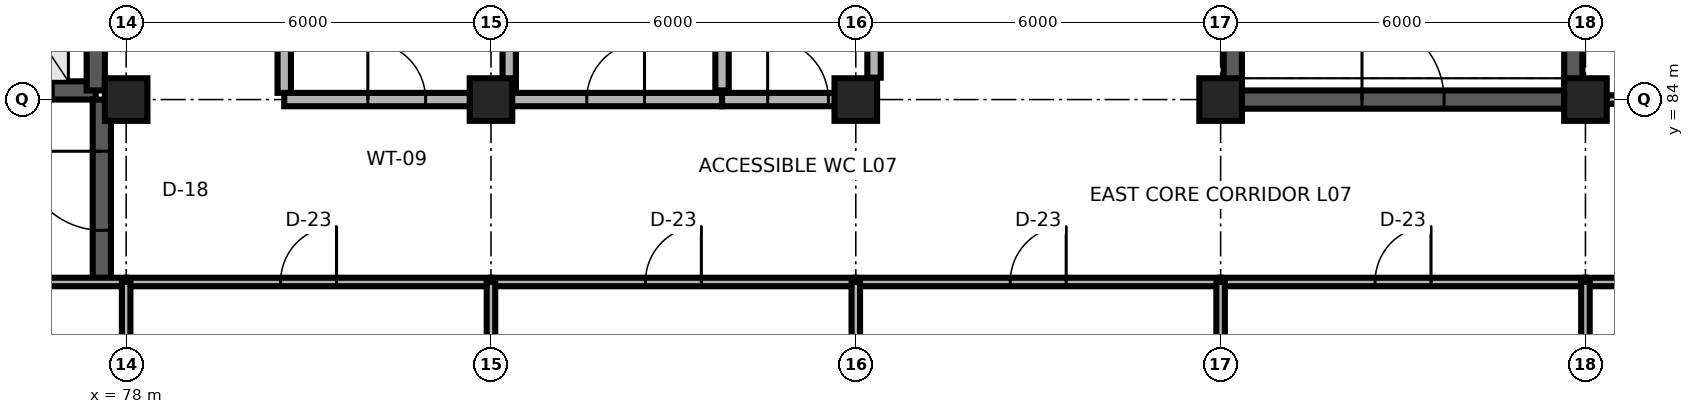
"""IFC4 building model, lengths in metres.
Left out: names, types, materials, properties, quantities, classifications, styles, units other than length and angle.
Written with IfcOpenShell. Run it as: python <this file> out.ifc"""

import sys

from ifc_helpers import new_model, si_unit, direction, frame, frame_2d, origin, origin_2d, place, context, subcontext, project, spatial, rectangle, extrude, element, fill, save


model = new_model("IFC4")
c1 = context("Model", 3, precision=1e-05, world=origin(), true_north=direction((0.0, 1.0)))
c2 = subcontext(c1, "Body", "Model", "MODEL_VIEW")
j1 = project(units=[si_unit("LENGTHUNIT", "METRE"), si_unit("PLANEANGLEUNIT", "RADIAN")], contexts=[c1])
p1 = place(None, origin())
s1 = spatial("IfcSite", under=j1, at=p1, CompositionType="ELEMENT")
p2 = place(p1, origin())
s2 = spatial("IfcBuilding", under=s1, at=p2, CompositionType="ELEMENT")
p3 = place(p2, frame((0.0, 0.0, 28.8)))
s3 = spatial("IfcBuildingStorey", under=s2, at=p3, CompositionType="ELEMENT", Elevation=28.8)
for number, where, z_axis, x_axis in (
    (1, (78.0, 84.0, 0.0), (0.0, 0.0, 1.0), (1.0, 0.0, 0.0)),
    (2, (84.0, 84.0, 0.0), (0.0, 0.0, 1.0), (1.0, 0.0, 0.0)),
    (3, (90.0, 84.0, 0.0), (0.0, 0.0, 1.0), (1.0, 0.0, 0.0)),
    (4, (96.0, 84.0, 0.0), (0.0, 0.0, 1.0), (1.0, 0.0, 0.0)),
    (5, (102.0, 84.0, 0.0), (0.0, 0.0, 1.0), (1.0, 0.0, 0.0)),
):
    element("IfcColumn", number, at=place(p3, frame(where, z_axis=z_axis, x_axis=x_axis)), inside=s3, PredefinedType="COLUMN", context=c2, shape_type="SweptSolid", body=[
        extrude(rectangle(XDim=0.7, YDim=0.7, at=origin_2d()), origin(), (0.0, 0.0, 1.0), 3.9),
    ])
p4 = place(p3, frame((96.35, 84.0, 0.0), z_axis=(0.0, 0.0, 1.0), x_axis=(1.0, 0.0, 0.0)))
e6 = element("IfcWall", 6, at=p4, inside=s3, PredefinedType="SHEAR", context=c2, shape_type="SweptSolid", body=[
    extrude(rectangle(XDim=5.3, YDim=0.3, at=frame_2d((2.65, 0.0))), origin(), (0.0, 0.0, 1.0), 3.66),
])
p5 = place(p4, frame((1.975, 0.0, 0.0)))
e7 = element("IfcOpeningElement", 7, at=p5, cuts=e6, PredefinedType="OPENING", context=c2, shape_type="SweptSolid", body=[
    extrude(rectangle(XDim=1.35, YDim=2.2, at=frame_2d((0.675, 1.1))), frame((0.0, 0.165, 0.0), z_axis=(0.0, -1.0, 0.0), x_axis=(1.0, 0.0, 0.0)), (0.0, 0.0, 1.0), 0.33),
])
for number, where, z_axis, x_axis in (
    (8, (96.2, 84.0, 0.0), (0.0, 0.0, 1.0), (0.0, 1.0, 0.0)),
    (9, (101.8, 84.0, 0.0), (0.0, 0.0, 1.0), (0.0, 1.0, 0.0)),
):
    element("IfcWall", number, at=place(p3, frame(where, z_axis=z_axis, x_axis=x_axis)), inside=s3, PredefinedType="SHEAR", context=c2, shape_type="SweptSolid", body=[
        extrude(rectangle(XDim=11.8, YDim=0.3, at=frame_2d((5.9, 0.0))), origin(), (0.0, 0.0, 1.0), 3.74),
    ])
p6 = place(p3, frame((75.0, 84.15, 0.0), z_axis=(0.0, 0.0, 1.0), x_axis=(1.0, 0.0, 0.0)))
e10 = element("IfcWall", 10, at=p6, inside=s3, PredefinedType="SHEAR", context=c2, shape_type="SweptSolid", body=[
    extrude(rectangle(XDim=2.5, YDim=0.3, at=frame_2d((1.25, 0.0))), origin(), (0.0, 0.0, 1.0), 3.74),
])
p7 = place(p6, frame((0.7, 0.0, 0.0)))
e11 = element("IfcOpeningElement", 11, at=p7, cuts=e10, PredefinedType="OPENING", context=c2, shape_type="SweptSolid", body=[
    extrude(rectangle(XDim=1.1, YDim=2.1, at=frame_2d((0.55, 1.05))), frame((0.0, 0.165, 0.0), z_axis=(0.0, -1.0, 0.0), x_axis=(1.0, 0.0, 0.0)), (0.0, 0.0, 1.0), 0.33),
])
p8 = place(p3, frame((77.5, 84.15, 0.0), z_axis=(0.0, 0.0, 1.0), x_axis=(0.0, 1.0, 0.0)))
e12 = element("IfcWall", 12, at=p8, inside=s3, PredefinedType="SHEAR", context=c2, shape_type="SweptSolid", body=[
    extrude(rectangle(XDim=3.4, YDim=0.3, at=frame_2d((1.7, 0.0))), origin(), (0.0, 0.0, 1.0), 3.74),
])
p9 = place(p3, frame((77.6, 81.0, 0.0), z_axis=(0.0, 0.0, 1.0), x_axis=(0.0, 1.0, 0.0)))
e13 = element("IfcWall", 13, at=p9, inside=s3, PredefinedType="SHEAR", context=c2, shape_type="SweptSolid", body=[
    extrude(rectangle(XDim=3.0, YDim=0.3, at=frame_2d((1.5, 0.0))), origin(), (0.0, 0.0, 1.0), 3.74),
])
p10 = place(p9, frame((0.85, 0.0, 0.0)))
e14 = element("IfcOpeningElement", 14, at=p10, cuts=e13, PredefinedType="OPENING", context=c2, shape_type="SweptSolid", body=[
    extrude(rectangle(XDim=1.3, YDim=2.2, at=frame_2d((0.65, 1.1))), frame((0.0, 0.165, 0.0), z_axis=(0.0, -1.0, 0.0), x_axis=(1.0, 0.0, 0.0)), (0.0, 0.0, 1.0), 0.33),
])
p11 = place(p3, frame((80.6, 84.0, 0.0), z_axis=(0.0, 0.0, 1.0), x_axis=(1.0, 0.0, 0.0)))
e15 = element("IfcWall", 15, at=p11, inside=s3, PredefinedType="PARTITIONING", context=c2, shape_type="SweptSolid", body=[
    extrude(rectangle(XDim=3.7, YDim=0.22, at=frame_2d((1.85, 0.0))), origin(), (0.0, 0.0, 1.0), 3.352),
])
p12 = place(p11, frame((1.375, 0.0, 0.0)))
e16 = element("IfcOpeningElement", 16, at=p12, cuts=e15, PredefinedType="OPENING", context=c2, shape_type="SweptSolid", body=[
    extrude(rectangle(XDim=0.95, YDim=2.15, at=frame_2d((0.475, 1.075))), frame((0.0, 0.125, 0.0), z_axis=(0.0, -1.0, 0.0), x_axis=(1.0, 0.0, 0.0)), (0.0, 0.0, 1.0), 0.25),
])
p13 = place(p3, frame((84.3, 84.0, 0.0), z_axis=(0.0, 0.0, 1.0), x_axis=(1.0, 0.0, 0.0)))
e17 = element("IfcWall", 17, at=p13, inside=s3, PredefinedType="PARTITIONING", context=c2, shape_type="SweptSolid", body=[
    extrude(rectangle(XDim=3.5, YDim=0.22, at=frame_2d((1.75, 0.0))), origin(), (0.0, 0.0, 1.0), 3.352),
])
p14 = place(p13, frame((1.275, 0.0, 0.0)))
e18 = element("IfcOpeningElement", 18, at=p14, cuts=e17, PredefinedType="OPENING", context=c2, shape_type="SweptSolid", body=[
    extrude(rectangle(XDim=0.95, YDim=2.1, at=frame_2d((0.475, 1.05))), frame((0.0, 0.125, 0.0), z_axis=(0.0, -1.0, 0.0), x_axis=(1.0, 0.0, 0.0)), (0.0, 0.0, 1.0), 0.25),
])
p15 = place(p3, frame((87.8, 84.0, 0.0), z_axis=(0.0, 0.0, 1.0), x_axis=(1.0, 0.0, 0.0)))
e19 = element("IfcWall", 19, at=p15, inside=s3, PredefinedType="PARTITIONING", context=c2, shape_type="SweptSolid", body=[
    extrude(rectangle(XDim=2.5, YDim=0.22, at=frame_2d((1.25, 0.0))), origin(), (0.0, 0.0, 1.0), 3.352),
])
p16 = place(p15, frame((0.75, 0.0, 0.0)))
e20 = element("IfcOpeningElement", 20, at=p16, cuts=e19, PredefinedType="OPENING", context=c2, shape_type="SweptSolid", body=[
    extrude(rectangle(XDim=1.0, YDim=2.15, at=frame_2d((0.5, 1.075))), frame((0.0, 0.125, 0.0), z_axis=(0.0, -1.0, 0.0), x_axis=(1.0, 0.0, 0.0)), (0.0, 0.0, 1.0), 0.25),
])
for number, where, z_axis, x_axis in (
    (21, (84.3, 84.15, 0.0), (0.0, 0.0, 1.0), (0.0, 1.0, 0.0)),
    (22, (87.8, 84.15, 0.0), (0.0, 0.0, 1.0), (0.0, 1.0, 0.0)),
):
    element("IfcWall", number, at=place(p3, frame(where, z_axis=z_axis, x_axis=x_axis)), inside=s3, PredefinedType="PARTITIONING", context=c2, shape_type="SweptSolid", body=[
        extrude(rectangle(XDim=5.0, YDim=0.22, at=frame_2d((2.5, 0.0))), origin(), (0.0, 0.0, 1.0), 3.74),
    ])
p17 = place(p3, frame((72.0, 81.0, 0.0), z_axis=(0.0, 0.0, 1.0), x_axis=(1.0, 0.0, 0.0)))
e23 = element("IfcWall", 23, at=p17, inside=s3, PredefinedType="PARTITIONING", context=c2, shape_type="SweptSolid", body=[
    extrude(rectangle(XDim=6.0, YDim=0.14, at=frame_2d((3.0, 0.0))), origin(), (0.0, 0.0, 1.0), 3.74),
])
p18 = place(p17, frame((2.54, 0.0, 0.0)))
e24 = element("IfcOpeningElement", 24, at=p18, cuts=e23, PredefinedType="OPENING", context=c2, shape_type="SweptSolid", body=[
    extrude(rectangle(XDim=0.92, YDim=2.15, at=frame_2d((0.46, 1.075))), frame((0.0, 0.085, 0.0), z_axis=(0.0, -1.0, 0.0), x_axis=(1.0, 0.0, 0.0)), (0.0, 0.0, 1.0), 0.17),
])
p19 = place(p3, frame((78.0, 81.0, 0.0), z_axis=(0.0, 0.0, 1.0), x_axis=(1.0, 0.0, 0.0)))
e25 = element("IfcWall", 25, at=p19, inside=s3, PredefinedType="PARTITIONING", context=c2, shape_type="SweptSolid", body=[
    extrude(rectangle(XDim=6.0, YDim=0.14, at=frame_2d((3.0, 0.0))), origin(), (0.0, 0.0, 1.0), 3.74),
])
p20 = place(p19, frame((2.54, 0.0, 0.0)))
e26 = element("IfcOpeningElement", 26, at=p20, cuts=e25, PredefinedType="OPENING", context=c2, shape_type="SweptSolid", body=[
    extrude(rectangle(XDim=0.92, YDim=2.15, at=frame_2d((0.46, 1.075))), frame((0.0, 0.085, 0.0), z_axis=(0.0, -1.0, 0.0), x_axis=(1.0, 0.0, 0.0)), (0.0, 0.0, 1.0), 0.17),
])
p21 = place(p3, frame((84.0, 81.0, 0.0), z_axis=(0.0, 0.0, 1.0), x_axis=(1.0, 0.0, 0.0)))
e27 = element("IfcWall", 27, at=p21, inside=s3, PredefinedType="PARTITIONING", context=c2, shape_type="SweptSolid", body=[
    extrude(rectangle(XDim=6.0, YDim=0.14, at=frame_2d((3.0, 0.0))), origin(), (0.0, 0.0, 1.0), 3.74),
])
p22 = place(p21, frame((2.54, 0.0, 0.0)))
e28 = element("IfcOpeningElement", 28, at=p22, cuts=e27, PredefinedType="OPENING", context=c2, shape_type="SweptSolid", body=[
    extrude(rectangle(XDim=0.92, YDim=2.15, at=frame_2d((0.46, 1.075))), frame((0.0, 0.085, 0.0), z_axis=(0.0, -1.0, 0.0), x_axis=(1.0, 0.0, 0.0)), (0.0, 0.0, 1.0), 0.17),
])
p23 = place(p3, frame((90.0, 81.0, 0.0), z_axis=(0.0, 0.0, 1.0), x_axis=(1.0, 0.0, 0.0)))
e29 = element("IfcWall", 29, at=p23, inside=s3, PredefinedType="PARTITIONING", context=c2, shape_type="SweptSolid", body=[
    extrude(rectangle(XDim=6.0, YDim=0.14, at=frame_2d((3.0, 0.0))), origin(), (0.0, 0.0, 1.0), 3.74),
])
p24 = place(p23, frame((2.54, 0.0, 0.0)))
e30 = element("IfcOpeningElement", 30, at=p24, cuts=e29, PredefinedType="OPENING", context=c2, shape_type="SweptSolid", body=[
    extrude(rectangle(XDim=0.92, YDim=2.15, at=frame_2d((0.46, 1.075))), frame((0.0, 0.085, 0.0), z_axis=(0.0, -1.0, 0.0), x_axis=(1.0, 0.0, 0.0)), (0.0, 0.0, 1.0), 0.17),
])
p25 = place(p3, frame((96.0, 81.0, 0.0), z_axis=(0.0, 0.0, 1.0), x_axis=(1.0, 0.0, 0.0)))
e31 = element("IfcWall", 31, at=p25, inside=s3, PredefinedType="PARTITIONING", context=c2, shape_type="SweptSolid", body=[
    extrude(rectangle(XDim=6.0, YDim=0.14, at=frame_2d((3.0, 0.0))), origin(), (0.0, 0.0, 1.0), 3.74),
])
p26 = place(p25, frame((2.54, 0.0, 0.0)))
e32 = element("IfcOpeningElement", 32, at=p26, cuts=e31, PredefinedType="OPENING", context=c2, shape_type="SweptSolid", body=[
    extrude(rectangle(XDim=0.92, YDim=2.15, at=frame_2d((0.46, 1.075))), frame((0.0, 0.085, 0.0), z_axis=(0.0, -1.0, 0.0), x_axis=(1.0, 0.0, 0.0)), (0.0, 0.0, 1.0), 0.17),
])
p27 = place(p3, frame((102.0, 81.0, 0.0), z_axis=(0.0, 0.0, 1.0), x_axis=(1.0, 0.0, 0.0)))
e33 = element("IfcWall", 33, at=p27, inside=s3, PredefinedType="PARTITIONING", context=c2, shape_type="SweptSolid", body=[
    extrude(rectangle(XDim=6.0, YDim=0.14, at=frame_2d((3.0, 0.0))), origin(), (0.0, 0.0, 1.0), 3.74),
])
p28 = place(p27, frame((2.54, 0.0, 0.0)))
e34 = element("IfcOpeningElement", 34, at=p28, cuts=e33, PredefinedType="OPENING", context=c2, shape_type="SweptSolid", body=[
    extrude(rectangle(XDim=0.92, YDim=2.15, at=frame_2d((0.46, 1.075))), frame((0.0, 0.085, 0.0), z_axis=(0.0, -1.0, 0.0), x_axis=(1.0, 0.0, 0.0)), (0.0, 0.0, 1.0), 0.17),
])
p29 = place(p3, frame((102.0, 84.0, 0.0), z_axis=(0.0, 0.0, 1.0), x_axis=(1.0, 0.0, 0.0)))
e35 = element("IfcWall", 35, at=p29, inside=s3, PredefinedType="PARTITIONING", context=c2, shape_type="SweptSolid", body=[
    extrude(rectangle(XDim=6.0, YDim=0.14, at=frame_2d((3.0, 0.0))), origin(), (0.0, 0.0, 1.0), 3.352),
])
p30 = place(p29, frame((2.475, 0.0, 0.0)))
e36 = element("IfcOpeningElement", 36, at=p30, cuts=e35, PredefinedType="OPENING", context=c2, shape_type="SweptSolid", body=[
    extrude(rectangle(XDim=1.05, YDim=2.25, at=frame_2d((0.525, 1.125))), frame((0.0, 0.085, 0.0), z_axis=(0.0, -1.0, 0.0), x_axis=(1.0, 0.0, 0.0)), (0.0, 0.0, 1.0), 0.17),
])
for number, where, z_axis, x_axis in (
    (37, (78.0, 72.65, 0.0), (0.0, 0.0, 1.0), (0.0, 1.0, 0.0)),
    (38, (84.0, 72.65, 0.0), (0.0, 0.0, 1.0), (0.0, 1.0, 0.0)),
    (39, (90.0, 72.65, 0.0), (0.0, 0.0, 1.0), (0.0, 1.0, 0.0)),
    (40, (96.0, 72.65, 0.0), (0.0, 0.0, 1.0), (0.0, 1.0, 0.0)),
    (41, (102.0, 72.65, 0.0), (0.0, 0.0, 1.0), (0.0, 1.0, 0.0)),
):
    element("IfcWall", number, at=place(p3, frame(where, z_axis=z_axis, x_axis=x_axis)), inside=s3, PredefinedType="PARTITIONING", context=c2, shape_type="SweptSolid", body=[
        extrude(rectangle(XDim=8.35, YDim=0.14, at=frame_2d((4.175, 0.0))), origin(), (0.0, 0.0, 1.0), 3.352),
    ])
p31 = place(p3, frame((80.6, 84.11, 0.0), z_axis=(0.0, 0.0, 1.0), x_axis=(0.0, 1.0, 0.0)))
e42 = element("IfcWall", 42, at=p31, inside=s3, PredefinedType="PARTITIONING", context=c2, shape_type="SweptSolid", body=[
    extrude(rectangle(XDim=4.98, YDim=0.22, at=frame_2d((2.49, 0.0))), origin(), (0.0, 0.0, 1.0), 3.74),
])
p32 = place(p3, frame((90.3, 84.36, 0.0), z_axis=(0.0, 0.0, 1.0), x_axis=(0.0, 1.0, 0.0)))
e43 = element("IfcWall", 43, at=p32, inside=s3, PredefinedType="PARTITIONING", context=c2, shape_type="SweptSolid", body=[
    extrude(rectangle(XDim=4.73, YDim=0.22, at=frame_2d((2.365, 0.0))), origin(), (0.0, 0.0, 1.0), 3.74),
])
p33 = place(p5, origin())
e44 = element("IfcDoor", 44, at=p33, inside=s3, OperationType="SINGLE_SWING_LEFT", PredefinedType="DOOR", context=c2, shape_type="SweptSolid", body=[
    extrude(rectangle(XDim=1.35, YDim=2.2, at=frame_2d((0.675, 1.1))), frame((0.0, 0.025, 0.0), z_axis=(0.0, -1.0, 0.0), x_axis=(1.0, 0.0, 0.0)), (0.0, 0.0, 1.0), 0.05),
])
fill(e7, e44)
p34 = place(p7, origin())
e45 = element("IfcDoor", 45, at=p34, inside=s3, OperationType="DOUBLE_DOOR_SLIDING", PredefinedType="DOOR", context=c2, shape_type="SweptSolid", body=[
    extrude(rectangle(XDim=1.1, YDim=2.1, at=frame_2d((0.55, 1.05))), frame((0.0, 0.025, 0.0), z_axis=(0.0, -1.0, 0.0), x_axis=(1.0, 0.0, 0.0)), (0.0, 0.0, 1.0), 0.05),
])
fill(e11, e45)
p35 = place(p10, origin())
e46 = element("IfcDoor", 46, at=p35, inside=s3, OperationType="SINGLE_SWING_RIGHT", PredefinedType="DOOR", context=c2, shape_type="SweptSolid", body=[
    extrude(rectangle(XDim=1.3, YDim=2.2, at=frame_2d((0.65, 1.1))), frame((0.0, 0.025, 0.0), z_axis=(0.0, -1.0, 0.0), x_axis=(1.0, 0.0, 0.0)), (0.0, 0.0, 1.0), 0.05),
])
fill(e14, e46)
p36 = place(p12, origin())
e47 = element("IfcDoor", 47, at=p36, inside=s3, OperationType="SINGLE_SWING_LEFT", PredefinedType="DOOR", context=c2, shape_type="SweptSolid", body=[
    extrude(rectangle(XDim=0.95, YDim=2.15, at=frame_2d((0.475, 1.075))), frame((0.0, 0.025, 0.0), z_axis=(0.0, -1.0, 0.0), x_axis=(1.0, 0.0, 0.0)), (0.0, 0.0, 1.0), 0.05),
])
fill(e16, e47)
p37 = place(p14, origin())
e48 = element("IfcDoor", 48, at=p37, inside=s3, OperationType="SINGLE_SWING_RIGHT", PredefinedType="DOOR", context=c2, shape_type="SweptSolid", body=[
    extrude(rectangle(XDim=0.95, YDim=2.1, at=frame_2d((0.475, 1.05))), frame((0.0, 0.025, 0.0), z_axis=(0.0, -1.0, 0.0), x_axis=(1.0, 0.0, 0.0)), (0.0, 0.0, 1.0), 0.05),
])
fill(e18, e48)
p38 = place(p16, origin())
e49 = element("IfcDoor", 49, at=p38, inside=s3, OperationType="SINGLE_SWING_LEFT", PredefinedType="DOOR", context=c2, shape_type="SweptSolid", body=[
    extrude(rectangle(XDim=1.0, YDim=2.15, at=frame_2d((0.5, 1.075))), frame((0.0, 0.025, 0.0), z_axis=(0.0, -1.0, 0.0), x_axis=(1.0, 0.0, 0.0)), (0.0, 0.0, 1.0), 0.05),
])
fill(e20, e49)
p39 = place(p20, origin())
e50 = element("IfcDoor", 50, at=p39, inside=s3, OperationType="SINGLE_SWING_RIGHT", PredefinedType="DOOR", context=c2, shape_type="SweptSolid", body=[
    extrude(rectangle(XDim=0.92, YDim=2.15, at=frame_2d((0.46, 1.075))), frame((0.0, 0.025, 0.0), z_axis=(0.0, -1.0, 0.0), x_axis=(1.0, 0.0, 0.0)), (0.0, 0.0, 1.0), 0.05),
])
fill(e26, e50)
p40 = place(p22, origin())
e51 = element("IfcDoor", 51, at=p40, inside=s3, OperationType="SINGLE_SWING_RIGHT", PredefinedType="DOOR", context=c2, shape_type="SweptSolid", body=[
    extrude(rectangle(XDim=0.92, YDim=2.15, at=frame_2d((0.46, 1.075))), frame((0.0, 0.025, 0.0), z_axis=(0.0, -1.0, 0.0), x_axis=(1.0, 0.0, 0.0)), (0.0, 0.0, 1.0), 0.05),
])
fill(e28, e51)
p41 = place(p24, origin())
e52 = element("IfcDoor", 52, at=p41, inside=s3, OperationType="SINGLE_SWING_RIGHT", PredefinedType="DOOR", context=c2, shape_type="SweptSolid", body=[
    extrude(rectangle(XDim=0.92, YDim=2.15, at=frame_2d((0.46, 1.075))), frame((0.0, 0.025, 0.0), z_axis=(0.0, -1.0, 0.0), x_axis=(1.0, 0.0, 0.0)), (0.0, 0.0, 1.0), 0.05),
])
fill(e30, e52)
p42 = place(p26, origin())
e53 = element("IfcDoor", 53, at=p42, inside=s3, OperationType="SINGLE_SWING_RIGHT", PredefinedType="DOOR", context=c2, shape_type="SweptSolid", body=[
    extrude(rectangle(XDim=0.92, YDim=2.15, at=frame_2d((0.46, 1.075))), frame((0.0, 0.025, 0.0), z_axis=(0.0, -1.0, 0.0), x_axis=(1.0, 0.0, 0.0)), (0.0, 0.0, 1.0), 0.05),
])
fill(e32, e53)
save(model, sys.argv[1])
